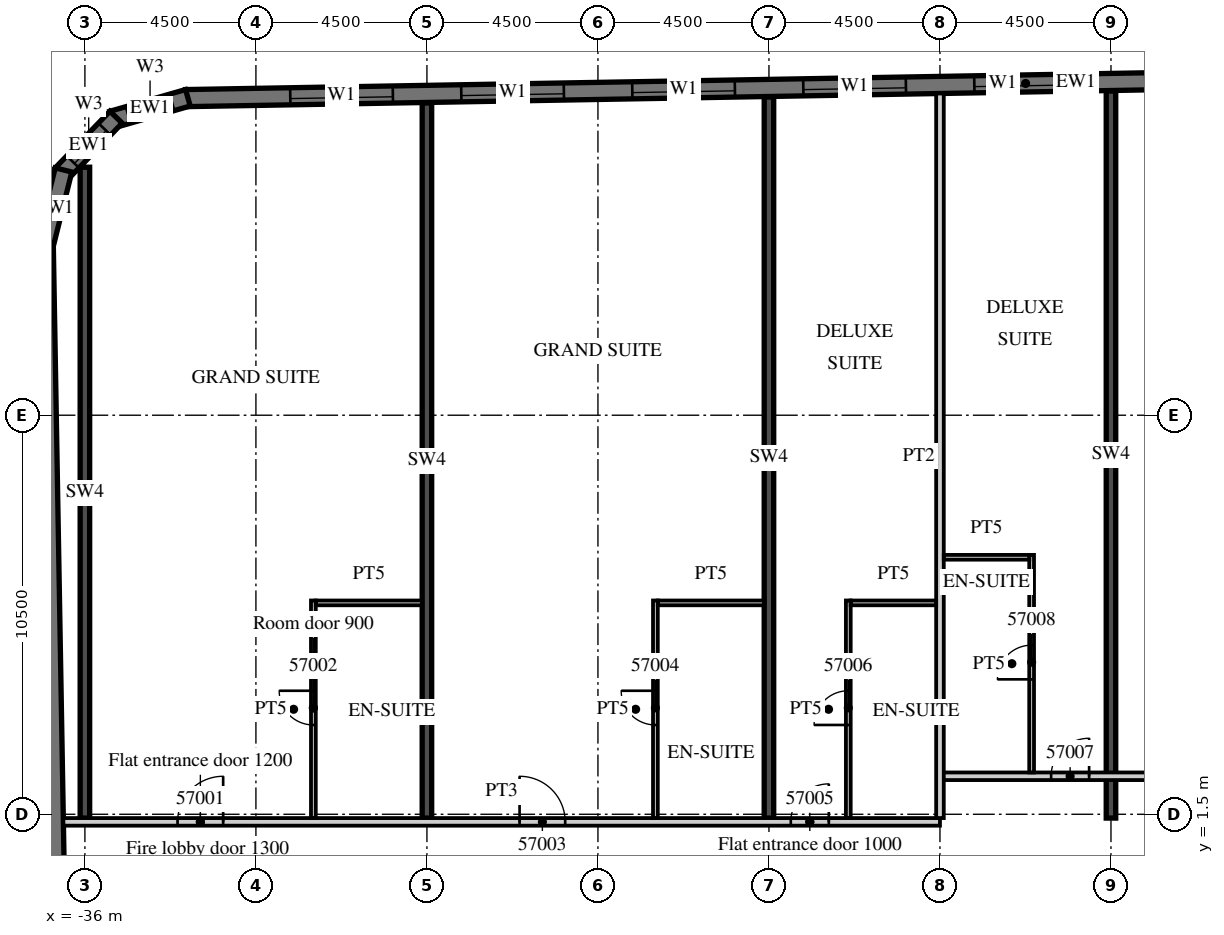
"""IFC4 building model, lengths in metres.
Left out: names, types, materials, properties, quantities, classifications, styles, units other than length and angle.
Written with IfcOpenShell. Run it as: python <this file> out.ifc"""

import sys

from ifc_helpers import new_model, si_unit, direction, frame, frame_2d, origin, place, context, subcontext, project, spatial, polyline, rectangle, outline, extrude, element, fill, save


model = new_model("IFC4")
c1 = context("Model", 3, precision=1e-05, world=origin(), true_north=direction((0.0, 1.0)))
c2 = subcontext(c1, "Body", "Model", "MODEL_VIEW")
j1 = project(units=[si_unit("LENGTHUNIT", "METRE"), si_unit("PLANEANGLEUNIT", "RADIAN")], contexts=[c1])
p1 = place(None, origin())
s1 = spatial("IfcSite", under=j1, at=p1, CompositionType="ELEMENT")
p2 = place(p1, origin())
s2 = spatial("IfcBuilding", under=s1, at=p2, CompositionType="ELEMENT")
p3 = place(p2, frame((0.0, 0.0, 234.2)))
s3 = spatial("IfcBuildingStorey", under=s2, at=p3, CompositionType="ELEMENT", Elevation=234.2)
p4 = place(p3, frame((-36.0, 1.4, 0.0), z_axis=(0.0, 0.0, 1.0), x_axis=(0.0, 1.0, 0.0)))
e1 = element("IfcWall", 1, at=p4, inside=s3, PredefinedType="SHEAR", context=c2, shape_type="SweptSolid", body=[
    extrude(rectangle(XDim=17.125, YDim=0.25, at=frame_2d((8.563, 0.0))), origin(), (0.0, 0.0, 1.0), 3.3),
])
p5 = place(p3, frame((-27.0, 1.4, 0.0), z_axis=(0.0, 0.0, 1.0), x_axis=(0.0, 1.0, 0.0)))
e2 = element("IfcWall", 2, at=p5, inside=s3, PredefinedType="SHEAR", context=c2, shape_type="SweptSolid", body=[
    extrude(rectangle(XDim=18.817, YDim=0.25, at=frame_2d((9.409, 0.0))), origin(), (0.0, 0.0, 1.0), 3.3),
])
p6 = place(p3, frame((-18.0, 1.4, 0.0), z_axis=(0.0, 0.0, 1.0), x_axis=(0.0, 1.0, 0.0)))
e3 = element("IfcWall", 3, at=p6, inside=s3, PredefinedType="SHEAR", context=c2, shape_type="SweptSolid", body=[
    extrude(rectangle(XDim=18.974, YDim=0.25, at=frame_2d((9.487, 0.0))), origin(), (0.0, 0.0, 1.0), 3.3),
])
p7 = place(p3, frame((-9.0, 1.4, 0.0), z_axis=(0.0, 0.0, 1.0), x_axis=(0.0, 1.0, 0.0)))
e4 = element("IfcWall", 4, at=p7, inside=s3, PredefinedType="SHEAR", context=c2, shape_type="SweptSolid", body=[
    extrude(rectangle(XDim=19.132, YDim=0.25, at=frame_2d((9.566, 0.0))), origin(), (0.0, 0.0, 1.0), 3.3),
])
p8 = place(p3, frame((-37.057, 16.503, 0.0), z_axis=(0.0, 0.0, 1.0), x_axis=(0.017452279857, -0.999847697366, 0.0)))
e5 = element("IfcWall", 5, at=p8, inside=s3, PredefinedType="SOLIDWALL", context=c2, shape_type="SweptSolid", body=[
    extrude(rectangle(XDim=33.0, YDim=0.45, at=frame_2d((16.5, 0.0))), origin(), (0.0, 0.0, 1.0), 3.02),
])
p9 = place(p3, frame((13.504, 21.161, 0.0), z_axis=(0.0, 0.0, 1.0), x_axis=(-0.999847763257, -0.017448504532, 0.0)))
e6 = element("IfcWall", 6, at=p9, inside=s3, PredefinedType="SOLIDWALL", context=c2, shape_type="SweptSolid", body=[
    extrude(rectangle(XDim=46.859, YDim=0.45, at=frame_2d((23.43, 0.0))), origin(), (0.0, 0.0, 1.0), 3.02),
])
p10 = place(p9, frame((0.9, 0.0, 0.45)))
e7 = element("IfcOpeningElement", 7, at=p10, cuts=e6, PredefinedType="OPENING", context=c2, shape_type="SweptSolid", body=[
    extrude(rectangle(XDim=2.7, YDim=2.25, at=frame_2d((1.35, 1.125))), frame((0.0, 0.235, 0.0), z_axis=(0.0, -1.0, 0.0), x_axis=(1.0, 0.0, 0.0)), (0.0, 0.0, 1.0), 0.47),
])
p11 = place(p9, frame((5.401, 0.0, 0.45)))
e8 = element("IfcOpeningElement", 8, at=p11, cuts=e6, PredefinedType="OPENING", context=c2, shape_type="SweptSolid", body=[
    extrude(rectangle(XDim=2.7, YDim=2.25, at=frame_2d((1.35, 1.125))), frame((0.0, 0.235, 0.0), z_axis=(0.0, -1.0, 0.0), x_axis=(1.0, 0.0, 0.0)), (0.0, 0.0, 1.0), 0.47),
])
p12 = place(p9, frame((9.902, 0.0, 0.45)))
e9 = element("IfcOpeningElement", 9, at=p12, cuts=e6, PredefinedType="OPENING", context=c2, shape_type="SweptSolid", body=[
    extrude(rectangle(XDim=2.7, YDim=2.25, at=frame_2d((1.35, 1.125))), frame((0.0, 0.235, 0.0), z_axis=(0.0, -1.0, 0.0), x_axis=(1.0, 0.0, 0.0)), (0.0, 0.0, 1.0), 0.47),
])
p13 = place(p9, frame((14.402, 0.0, 0.45)))
e10 = element("IfcOpeningElement", 10, at=p13, cuts=e6, PredefinedType="OPENING", context=c2, shape_type="SweptSolid", body=[
    extrude(rectangle(XDim=2.7, YDim=2.25, at=frame_2d((1.35, 1.125))), frame((0.0, 0.235, 0.0), z_axis=(0.0, -1.0, 0.0), x_axis=(1.0, 0.0, 0.0)), (0.0, 0.0, 1.0), 0.47),
])
p14 = place(p9, frame((18.903, 0.0, 0.45)))
e11 = element("IfcOpeningElement", 11, at=p14, cuts=e6, PredefinedType="OPENING", context=c2, shape_type="SweptSolid", body=[
    extrude(rectangle(XDim=2.7, YDim=2.25, at=frame_2d((1.35, 1.125))), frame((0.0, 0.235, 0.0), z_axis=(0.0, -1.0, 0.0), x_axis=(1.0, 0.0, 0.0)), (0.0, 0.0, 1.0), 0.47),
])
p15 = place(p9, frame((23.404, 0.0, 0.45)))
e12 = element("IfcOpeningElement", 12, at=p15, cuts=e6, PredefinedType="OPENING", context=c2, shape_type="SweptSolid", body=[
    extrude(rectangle(XDim=2.7, YDim=2.25, at=frame_2d((1.35, 1.125))), frame((0.0, 0.235, 0.0), z_axis=(0.0, -1.0, 0.0), x_axis=(1.0, 0.0, 0.0)), (0.0, 0.0, 1.0), 0.47),
])
p16 = place(p9, frame((27.904, 0.0, 0.45)))
e13 = element("IfcOpeningElement", 13, at=p16, cuts=e6, PredefinedType="OPENING", context=c2, shape_type="SweptSolid", body=[
    extrude(rectangle(XDim=2.7, YDim=2.25, at=frame_2d((1.35, 1.125))), frame((0.0, 0.235, 0.0), z_axis=(0.0, -1.0, 0.0), x_axis=(1.0, 0.0, 0.0)), (0.0, 0.0, 1.0), 0.47),
])
p17 = place(p9, frame((32.405, 0.0, 0.45)))
e14 = element("IfcOpeningElement", 14, at=p17, cuts=e6, PredefinedType="OPENING", context=c2, shape_type="SweptSolid", body=[
    extrude(rectangle(XDim=2.7, YDim=2.25, at=frame_2d((1.35, 1.125))), frame((0.0, 0.235, 0.0), z_axis=(0.0, -1.0, 0.0), x_axis=(1.0, 0.0, 0.0)), (0.0, 0.0, 1.0), 0.47),
])
p18 = place(p9, frame((36.906, 0.0, 0.45)))
e15 = element("IfcOpeningElement", 15, at=p18, cuts=e6, PredefinedType="OPENING", context=c2, shape_type="SweptSolid", body=[
    extrude(rectangle(XDim=2.7, YDim=2.25, at=frame_2d((1.35, 1.125))), frame((0.0, 0.235, 0.0), z_axis=(0.0, -1.0, 0.0), x_axis=(1.0, 0.0, 0.0)), (0.0, 0.0, 1.0), 0.47),
])
p19 = place(p9, frame((41.406, 0.0, 0.45)))
e16 = element("IfcOpeningElement", 16, at=p19, cuts=e6, PredefinedType="OPENING", context=c2, shape_type="SweptSolid", body=[
    extrude(rectangle(XDim=2.7, YDim=2.25, at=frame_2d((1.35, 1.125))), frame((0.0, 0.235, 0.0), z_axis=(0.0, -1.0, 0.0), x_axis=(1.0, 0.0, 0.0)), (0.0, 0.0, 1.0), 0.47),
])
p20 = place(p3, frame((-33.29, 20.352, 0.0), z_axis=(0.0, 0.0, 1.0), x_axis=(-0.961247584925, -0.275686562016, 0.0)))
e17 = element("IfcWall", 17, at=p20, inside=s3, PredefinedType="SOLIDWALL", context=c2, shape_type="SweptSolid", body=[
    extrude(outline(polyline([(0.0, -0.225), (2.071, -0.225), (1.95, 0.225), (0.121, 0.225), (0.0, -0.225)])), origin(), (0.0, 0.0, 1.0), 3.02),
])
p21 = place(p20, frame((0.435, 0.0, 0.45)))
e18 = element("IfcOpeningElement", 18, at=p21, cuts=e17, PredefinedType="OPENING", context=c2, shape_type="SweptSolid", body=[
    extrude(rectangle(XDim=1.2, YDim=2.25, at=frame_2d((0.6, 1.125))), frame((0.0, 0.235, 0.0), z_axis=(0.0, -1.0, 0.0), x_axis=(1.0, 0.0, 0.0)), (0.0, 0.0, 1.0), 0.47),
])
p22 = place(p3, frame((-35.181, 19.842, 0.0), z_axis=(0.0, 0.0, 1.0), x_axis=(-0.694678672846, -0.719320193998, 0.0)))
e19 = element("IfcWall", 19, at=p22, inside=s3, PredefinedType="SOLIDWALL", context=c2, shape_type="SweptSolid", body=[
    extrude(outline(polyline([(0.0, -0.225), (2.071, -0.225), (1.95, 0.225), (0.121, 0.225), (0.0, -0.225)])), origin(), (0.0, 0.0, 1.0), 3.02),
])
p23 = place(p22, frame((0.435, 0.0, 0.45)))
e20 = element("IfcOpeningElement", 20, at=p23, cuts=e19, PredefinedType="OPENING", context=c2, shape_type="SweptSolid", body=[
    extrude(rectangle(XDim=1.2, YDim=2.25, at=frame_2d((0.6, 1.125))), frame((0.0, 0.235, 0.0), z_axis=(0.0, -1.0, 0.0), x_axis=(1.0, 0.0, 0.0)), (0.0, 0.0, 1.0), 0.47),
])
p24 = place(p3, frame((-36.563, 18.454, 0.0), z_axis=(0.0, 0.0, 1.0), x_axis=(-0.241869623482, -0.970308757683, 0.0)))
e21 = element("IfcWall", 21, at=p24, inside=s3, PredefinedType="SOLIDWALL", context=c2, shape_type="SweptSolid", body=[
    extrude(outline(polyline([(-0.0, -0.225), (2.07, -0.225), (1.95, 0.225), (0.12, 0.225), (-0.0, -0.225)])), origin(), (0.0, 0.0, 1.0), 3.02),
])
p25 = place(p3, frame((-36.566, 1.3, 0.0), z_axis=(0.0, 0.0, 1.0), x_axis=(1.0, 0.0, 0.0)))
e22 = element("IfcWall", 22, at=p25, inside=s3, PredefinedType="PARTITIONING", context=c2, shape_type="SweptSolid", body=[
    extrude(rectangle(XDim=23.066, YDim=0.2, at=frame_2d((11.533, 0.0))), origin(), (0.0, 0.0, 1.0), 3.02),
])
p26 = place(p25, frame((3.004, 0.0, 0.0)))
e23 = element("IfcOpeningElement", 23, at=p26, cuts=e22, PredefinedType="OPENING", context=c2, shape_type="SweptSolid", body=[
    extrude(rectangle(XDim=1.2, YDim=2.1, at=frame_2d((0.6, 1.05))), frame((0.0, 0.11, 0.0), z_axis=(0.0, -1.0, 0.0), x_axis=(1.0, 0.0, 0.0)), (0.0, 0.0, 1.0), 0.22),
])
p27 = place(p25, frame((12.004, 0.0, 0.0)))
e24 = element("IfcOpeningElement", 24, at=p27, cuts=e22, PredefinedType="OPENING", context=c2, shape_type="SweptSolid", body=[
    extrude(rectangle(XDim=1.2, YDim=2.1, at=frame_2d((0.6, 1.05))), frame((0.0, 0.11, 0.0), z_axis=(0.0, -1.0, 0.0), x_axis=(1.0, 0.0, 0.0)), (0.0, 0.0, 1.0), 0.22),
])
p28 = place(p25, frame((19.141, 0.0, 0.0)))
e25 = element("IfcOpeningElement", 25, at=p28, cuts=e22, PredefinedType="OPENING", context=c2, shape_type="SweptSolid", body=[
    extrude(rectangle(XDim=1.0, YDim=2.1, at=frame_2d((0.5, 1.05))), frame((0.0, 0.11, 0.0), z_axis=(0.0, -1.0, 0.0), x_axis=(1.0, 0.0, 0.0)), (0.0, 0.0, 1.0), 0.22),
])
p29 = place(p3, frame((-13.5, 2.5, 0.0), z_axis=(0.0, 0.0, 1.0), x_axis=(1.0, 0.0, 0.0)))
e26 = element("IfcWall", 26, at=p29, inside=s3, PredefinedType="PARTITIONING", context=c2, shape_type="SweptSolid", body=[
    extrude(rectangle(XDim=27.0, YDim=0.2, at=frame_2d((13.5, 0.0))), origin(), (0.0, 0.0, 1.0), 3.02),
])
p30 = place(p29, frame((2.925, 0.0, 0.0)))
e27 = element("IfcOpeningElement", 27, at=p30, cuts=e26, PredefinedType="OPENING", context=c2, shape_type="SweptSolid", body=[
    extrude(rectangle(XDim=1.0, YDim=2.1, at=frame_2d((0.5, 1.05))), frame((0.0, 0.11, 0.0), z_axis=(0.0, -1.0, 0.0), x_axis=(1.0, 0.0, 0.0)), (0.0, 0.0, 1.0), 0.22),
])
p31 = place(p29, frame((6.938, 0.0, 0.0)))
e28 = element("IfcOpeningElement", 28, at=p31, cuts=e26, PredefinedType="OPENING", context=c2, shape_type="SweptSolid", body=[
    extrude(rectangle(XDim=1.2, YDim=2.1, at=frame_2d((0.6, 1.05))), frame((0.0, 0.11, 0.0), z_axis=(0.0, -1.0, 0.0), x_axis=(1.0, 0.0, 0.0)), (0.0, 0.0, 1.0), 0.22),
])
p32 = place(p29, frame((14.075, 0.0, 0.0)))
e29 = element("IfcOpeningElement", 29, at=p32, cuts=e26, PredefinedType="OPENING", context=c2, shape_type="SweptSolid", body=[
    extrude(rectangle(XDim=1.0, YDim=2.1, at=frame_2d((0.5, 1.05))), frame((0.0, 0.11, 0.0), z_axis=(0.0, -1.0, 0.0), x_axis=(1.0, 0.0, 0.0)), (0.0, 0.0, 1.0), 0.22),
])
p33 = place(p29, frame((20.925, 0.0, 0.0)))
e30 = element("IfcOpeningElement", 30, at=p33, cuts=e26, PredefinedType="OPENING", context=c2, shape_type="SweptSolid", body=[
    extrude(rectangle(XDim=1.0, YDim=2.1, at=frame_2d((0.5, 1.05))), frame((0.0, 0.11, 0.0), z_axis=(0.0, -1.0, 0.0), x_axis=(1.0, 0.0, 0.0)), (0.0, 0.0, 1.0), 0.22),
])
p34 = place(p29, frame((25.425, 0.0, 0.0)))
e31 = element("IfcOpeningElement", 31, at=p34, cuts=e26, PredefinedType="OPENING", context=c2, shape_type="SweptSolid", body=[
    extrude(rectangle(XDim=1.0, YDim=2.1, at=frame_2d((0.5, 1.05))), frame((0.0, 0.11, 0.0), z_axis=(0.0, -1.0, 0.0), x_axis=(1.0, 0.0, 0.0)), (0.0, 0.0, 1.0), 0.22),
])
p35 = place(p3, frame((-29.988, 1.4, 0.0), z_axis=(0.0, 0.0, 1.0), x_axis=(0.0, 1.0, 0.0)))
e32 = element("IfcWall", 32, at=p35, inside=s3, PredefinedType="PARTITIONING", context=c2, shape_type="SweptSolid", body=[
    extrude(rectangle(XDim=5.725, YDim=0.125, at=frame_2d((2.863, 0.0))), origin(), (0.0, 0.0, 1.0), 3.02),
])
p36 = place(p35, frame((2.45, 0.0, 0.0)))
e33 = element("IfcOpeningElement", 33, at=p36, cuts=e32, PredefinedType="OPENING", context=c2, shape_type="SweptSolid", body=[
    extrude(rectangle(XDim=0.9, YDim=2.1, at=frame_2d((0.45, 1.05))), frame((0.0, 0.073, 0.0), z_axis=(0.0, -1.0, 0.0), x_axis=(1.0, 0.0, 0.0)), (0.0, 0.0, 1.0), 0.145),
])
p37 = place(p3, frame((-29.925, 7.062, 0.0), z_axis=(0.0, 0.0, 1.0), x_axis=(1.0, 0.0, 0.0)))
e34 = element("IfcWall", 34, at=p37, inside=s3, PredefinedType="PARTITIONING", context=c2, shape_type="SweptSolid", body=[
    extrude(rectangle(XDim=2.8, YDim=0.125, at=frame_2d((1.4, 0.0))), origin(), (0.0, 0.0, 1.0), 3.02),
])
p38 = place(p3, frame((-20.988, 1.4, 0.0), z_axis=(0.0, 0.0, 1.0), x_axis=(0.0, 1.0, 0.0)))
e35 = element("IfcWall", 35, at=p38, inside=s3, PredefinedType="PARTITIONING", context=c2, shape_type="SweptSolid", body=[
    extrude(rectangle(XDim=5.725, YDim=0.125, at=frame_2d((2.863, 0.0))), origin(), (0.0, 0.0, 1.0), 3.02),
])
p39 = place(p38, frame((2.45, 0.0, 0.0)))
e36 = element("IfcOpeningElement", 36, at=p39, cuts=e35, PredefinedType="OPENING", context=c2, shape_type="SweptSolid", body=[
    extrude(rectangle(XDim=0.9, YDim=2.1, at=frame_2d((0.45, 1.05))), frame((0.0, 0.073, 0.0), z_axis=(0.0, -1.0, 0.0), x_axis=(1.0, 0.0, 0.0)), (0.0, 0.0, 1.0), 0.145),
])
p40 = place(p3, frame((-20.925, 7.062, 0.0), z_axis=(0.0, 0.0, 1.0), x_axis=(1.0, 0.0, 0.0)))
e37 = element("IfcWall", 37, at=p40, inside=s3, PredefinedType="PARTITIONING", context=c2, shape_type="SweptSolid", body=[
    extrude(rectangle(XDim=2.8, YDim=0.125, at=frame_2d((1.4, 0.0))), origin(), (0.0, 0.0, 1.0), 3.02),
])
p41 = place(p3, frame((-13.5, 1.4, 0.0), z_axis=(0.0, 0.0, 1.0), x_axis=(0.0, 1.0, 0.0)))
e38 = element("IfcWall", 38, at=p41, inside=s3, PredefinedType="PARTITIONING", context=c2, shape_type="SweptSolid", body=[
    extrude(rectangle(XDim=19.065, YDim=0.2, at=frame_2d((9.533, 0.0))), origin(), (0.0, 0.0, 1.0), 3.02),
])
p42 = place(p3, frame((-15.912, 1.4, 0.0), z_axis=(0.0, 0.0, 1.0), x_axis=(0.0, 1.0, 0.0)))
e39 = element("IfcWall", 39, at=p42, inside=s3, PredefinedType="PARTITIONING", context=c2, shape_type="SweptSolid", body=[
    extrude(rectangle(XDim=5.725, YDim=0.125, at=frame_2d((2.863, 0.0))), origin(), (0.0, 0.0, 1.0), 3.02),
])
p43 = place(p42, frame((2.45, 0.0, 0.0)))
e40 = element("IfcOpeningElement", 40, at=p43, cuts=e39, PredefinedType="OPENING", context=c2, shape_type="SweptSolid", body=[
    extrude(rectangle(XDim=0.9, YDim=2.1, at=frame_2d((0.45, 1.05))), frame((0.0, 0.073, 0.0), z_axis=(0.0, -1.0, 0.0), x_axis=(1.0, 0.0, 0.0)), (0.0, 0.0, 1.0), 0.145),
])
p44 = place(p3, frame((-15.85, 7.062, 0.0), z_axis=(0.0, 0.0, 1.0), x_axis=(1.0, 0.0, 0.0)))
e41 = element("IfcWall", 41, at=p44, inside=s3, PredefinedType="PARTITIONING", context=c2, shape_type="SweptSolid", body=[
    extrude(rectangle(XDim=2.25, YDim=0.125, at=frame_2d((1.125, 0.0))), origin(), (0.0, 0.0, 1.0), 3.02),
])
p45 = place(p3, frame((-11.088, 2.6, 0.0), z_axis=(0.0, 0.0, 1.0), x_axis=(0.0, 1.0, 0.0)))
e42 = element("IfcWall", 42, at=p45, inside=s3, PredefinedType="PARTITIONING", context=c2, shape_type="SweptSolid", body=[
    extrude(rectangle(XDim=5.725, YDim=0.125, at=frame_2d((2.862, 0.0))), origin(), (0.0, 0.0, 1.0), 3.02),
])
p46 = place(p45, frame((2.45, 0.0, 0.0)))
e43 = element("IfcOpeningElement", 43, at=p46, cuts=e42, PredefinedType="OPENING", context=c2, shape_type="SweptSolid", body=[
    extrude(rectangle(XDim=0.9, YDim=2.1, at=frame_2d((0.45, 1.05))), frame((0.0, 0.073, 0.0), z_axis=(0.0, -1.0, 0.0), x_axis=(1.0, 0.0, 0.0)), (0.0, 0.0, 1.0), 0.145),
])
p47 = place(p3, frame((-13.4, 8.262, 0.0), z_axis=(0.0, 0.0, 1.0), x_axis=(1.0, 0.0, 0.0)))
e44 = element("IfcWall", 44, at=p47, inside=s3, PredefinedType="PARTITIONING", context=c2, shape_type="SweptSolid", body=[
    extrude(rectangle(XDim=2.25, YDim=0.125, at=frame_2d((1.125, 0.0))), origin(), (0.0, 0.0, 1.0), 3.02),
])
p48 = place(p15, origin())
e45 = element("IfcWindow", 45, at=p48, inside=s3, PartitioningType="SINGLE_PANEL", PredefinedType="WINDOW", context=c2, shape_type="SweptSolid", body=[
    extrude(rectangle(XDim=2.7, YDim=2.25, at=frame_2d((1.35, 1.125))), frame((0.0, 0.09, 0.0), z_axis=(0.0, -1.0, 0.0), x_axis=(1.0, 0.0, 0.0)), (0.0, 0.0, 1.0), 0.06),
])
fill(e12, e45)
p49 = place(p16, origin())
e46 = element("IfcWindow", 46, at=p49, inside=s3, PartitioningType="SINGLE_PANEL", PredefinedType="WINDOW", context=c2, shape_type="SweptSolid", body=[
    extrude(rectangle(XDim=2.7, YDim=2.25, at=frame_2d((1.35, 1.125))), frame((0.0, 0.09, 0.0), z_axis=(0.0, -1.0, 0.0), x_axis=(1.0, 0.0, 0.0)), (0.0, 0.0, 1.0), 0.06),
])
fill(e13, e46)
p50 = place(p17, origin())
e47 = element("IfcWindow", 47, at=p50, inside=s3, PartitioningType="SINGLE_PANEL", PredefinedType="WINDOW", context=c2, shape_type="SweptSolid", body=[
    extrude(rectangle(XDim=2.7, YDim=2.25, at=frame_2d((1.35, 1.125))), frame((0.0, 0.09, 0.0), z_axis=(0.0, -1.0, 0.0), x_axis=(1.0, 0.0, 0.0)), (0.0, 0.0, 1.0), 0.06),
])
fill(e14, e47)
p51 = place(p18, origin())
e48 = element("IfcWindow", 48, at=p51, inside=s3, PartitioningType="SINGLE_PANEL", PredefinedType="WINDOW", context=c2, shape_type="SweptSolid", body=[
    extrude(rectangle(XDim=2.7, YDim=2.25, at=frame_2d((1.35, 1.125))), frame((0.0, 0.09, 0.0), z_axis=(0.0, -1.0, 0.0), x_axis=(1.0, 0.0, 0.0)), (0.0, 0.0, 1.0), 0.06),
])
fill(e15, e48)
p52 = place(p19, origin())
e49 = element("IfcWindow", 49, at=p52, inside=s3, PartitioningType="SINGLE_PANEL", PredefinedType="WINDOW", context=c2, shape_type="SweptSolid", body=[
    extrude(rectangle(XDim=2.7, YDim=2.25, at=frame_2d((1.35, 1.125))), frame((0.0, 0.09, 0.0), z_axis=(0.0, -1.0, 0.0), x_axis=(1.0, 0.0, 0.0)), (0.0, 0.0, 1.0), 0.06),
])
fill(e16, e49)
p53 = place(p21, origin())
e50 = element("IfcWindow", 50, at=p53, inside=s3, PartitioningType="SINGLE_PANEL", PredefinedType="WINDOW", context=c2, shape_type="SweptSolid", body=[
    extrude(rectangle(XDim=1.2, YDim=2.25, at=frame_2d((0.6, 1.125))), frame((0.0, 0.09, 0.0), z_axis=(0.0, -1.0, 0.0), x_axis=(1.0, 0.0, 0.0)), (0.0, 0.0, 1.0), 0.06),
])
fill(e18, e50)
p54 = place(p23, origin())
e51 = element("IfcWindow", 51, at=p54, inside=s3, PartitioningType="SINGLE_PANEL", PredefinedType="WINDOW", context=c2, shape_type="SweptSolid", body=[
    extrude(rectangle(XDim=1.2, YDim=2.25, at=frame_2d((0.6, 1.125))), frame((0.0, 0.09, 0.0), z_axis=(0.0, -1.0, 0.0), x_axis=(1.0, 0.0, 0.0)), (0.0, 0.0, 1.0), 0.06),
])
fill(e20, e51)
p55 = place(p26, origin())
e52 = element("IfcDoor", 52, at=p55, inside=s3, OperationType="SINGLE_SWING_RIGHT", PredefinedType="DOOR", context=c2, shape_type="SweptSolid", body=[
    extrude(rectangle(XDim=1.2, YDim=2.1, at=frame_2d((0.6, 1.05))), frame((0.0, 0.025, 0.0), z_axis=(0.0, -1.0, 0.0), x_axis=(1.0, 0.0, 0.0)), (0.0, 0.0, 1.0), 0.05),
])
fill(e23, e52)
p56 = place(p36, origin())
e53 = element("IfcDoor", 53, at=p56, inside=s3, OperationType="SINGLE_SWING_RIGHT", PredefinedType="DOOR", context=c2, shape_type="SweptSolid", body=[
    extrude(rectangle(XDim=0.9, YDim=2.1, at=frame_2d((0.45, 1.05))), frame((0.0, 0.025, 0.0), z_axis=(0.0, -1.0, 0.0), x_axis=(1.0, 0.0, 0.0)), (0.0, 0.0, 1.0), 0.05),
])
fill(e33, e53)
p57 = place(p27, origin())
e54 = element("IfcDoor", 54, at=p57, inside=s3, OperationType="SINGLE_SWING_LEFT", PredefinedType="DOOR", context=c2, shape_type="SweptSolid", body=[
    extrude(rectangle(XDim=1.2, YDim=2.1, at=frame_2d((0.6, 1.05))), frame((0.0, 0.025, 0.0), z_axis=(0.0, -1.0, 0.0), x_axis=(1.0, 0.0, 0.0)), (0.0, 0.0, 1.0), 0.05),
])
fill(e24, e54)
p58 = place(p39, origin())
e55 = element("IfcDoor", 55, at=p58, inside=s3, OperationType="SINGLE_SWING_RIGHT", PredefinedType="DOOR", context=c2, shape_type="SweptSolid", body=[
    extrude(rectangle(XDim=0.9, YDim=2.1, at=frame_2d((0.45, 1.05))), frame((0.0, 0.025, 0.0), z_axis=(0.0, -1.0, 0.0), x_axis=(1.0, 0.0, 0.0)), (0.0, 0.0, 1.0), 0.05),
])
fill(e36, e55)
p59 = place(p28, origin())
e56 = element("IfcDoor", 56, at=p59, inside=s3, OperationType="SINGLE_SWING_RIGHT", PredefinedType="DOOR", context=c2, shape_type="SweptSolid", body=[
    extrude(rectangle(XDim=1.0, YDim=2.1, at=frame_2d((0.5, 1.05))), frame((0.0, 0.025, 0.0), z_axis=(0.0, -1.0, 0.0), x_axis=(1.0, 0.0, 0.0)), (0.0, 0.0, 1.0), 0.05),
])
fill(e25, e56)
p60 = place(p43, origin())
e57 = element("IfcDoor", 57, at=p60, inside=s3, OperationType="SINGLE_SWING_LEFT", PredefinedType="DOOR", context=c2, shape_type="SweptSolid", body=[
    extrude(rectangle(XDim=0.9, YDim=2.1, at=frame_2d((0.45, 1.05))), frame((0.0, 0.025, 0.0), z_axis=(0.0, -1.0, 0.0), x_axis=(1.0, 0.0, 0.0)), (0.0, 0.0, 1.0), 0.05),
])
fill(e40, e57)
p61 = place(p30, origin())
e58 = element("IfcDoor", 58, at=p61, inside=s3, OperationType="SINGLE_SWING_RIGHT", PredefinedType="DOOR", context=c2, shape_type="SweptSolid", body=[
    extrude(rectangle(XDim=1.0, YDim=2.1, at=frame_2d((0.5, 1.05))), frame((0.0, 0.025, 0.0), z_axis=(0.0, -1.0, 0.0), x_axis=(1.0, 0.0, 0.0)), (0.0, 0.0, 1.0), 0.05),
])
fill(e27, e58)
p62 = place(p46, origin())
e59 = element("IfcDoor", 59, at=p62, inside=s3, OperationType="SINGLE_SWING_LEFT", PredefinedType="DOOR", context=c2, shape_type="SweptSolid", body=[
    extrude(rectangle(XDim=0.9, YDim=2.1, at=frame_2d((0.45, 1.05))), frame((0.0, 0.025, 0.0), z_axis=(0.0, -1.0, 0.0), x_axis=(1.0, 0.0, 0.0)), (0.0, 0.0, 1.0), 0.05),
])
fill(e43, e59)
save(model, sys.argv[1])
